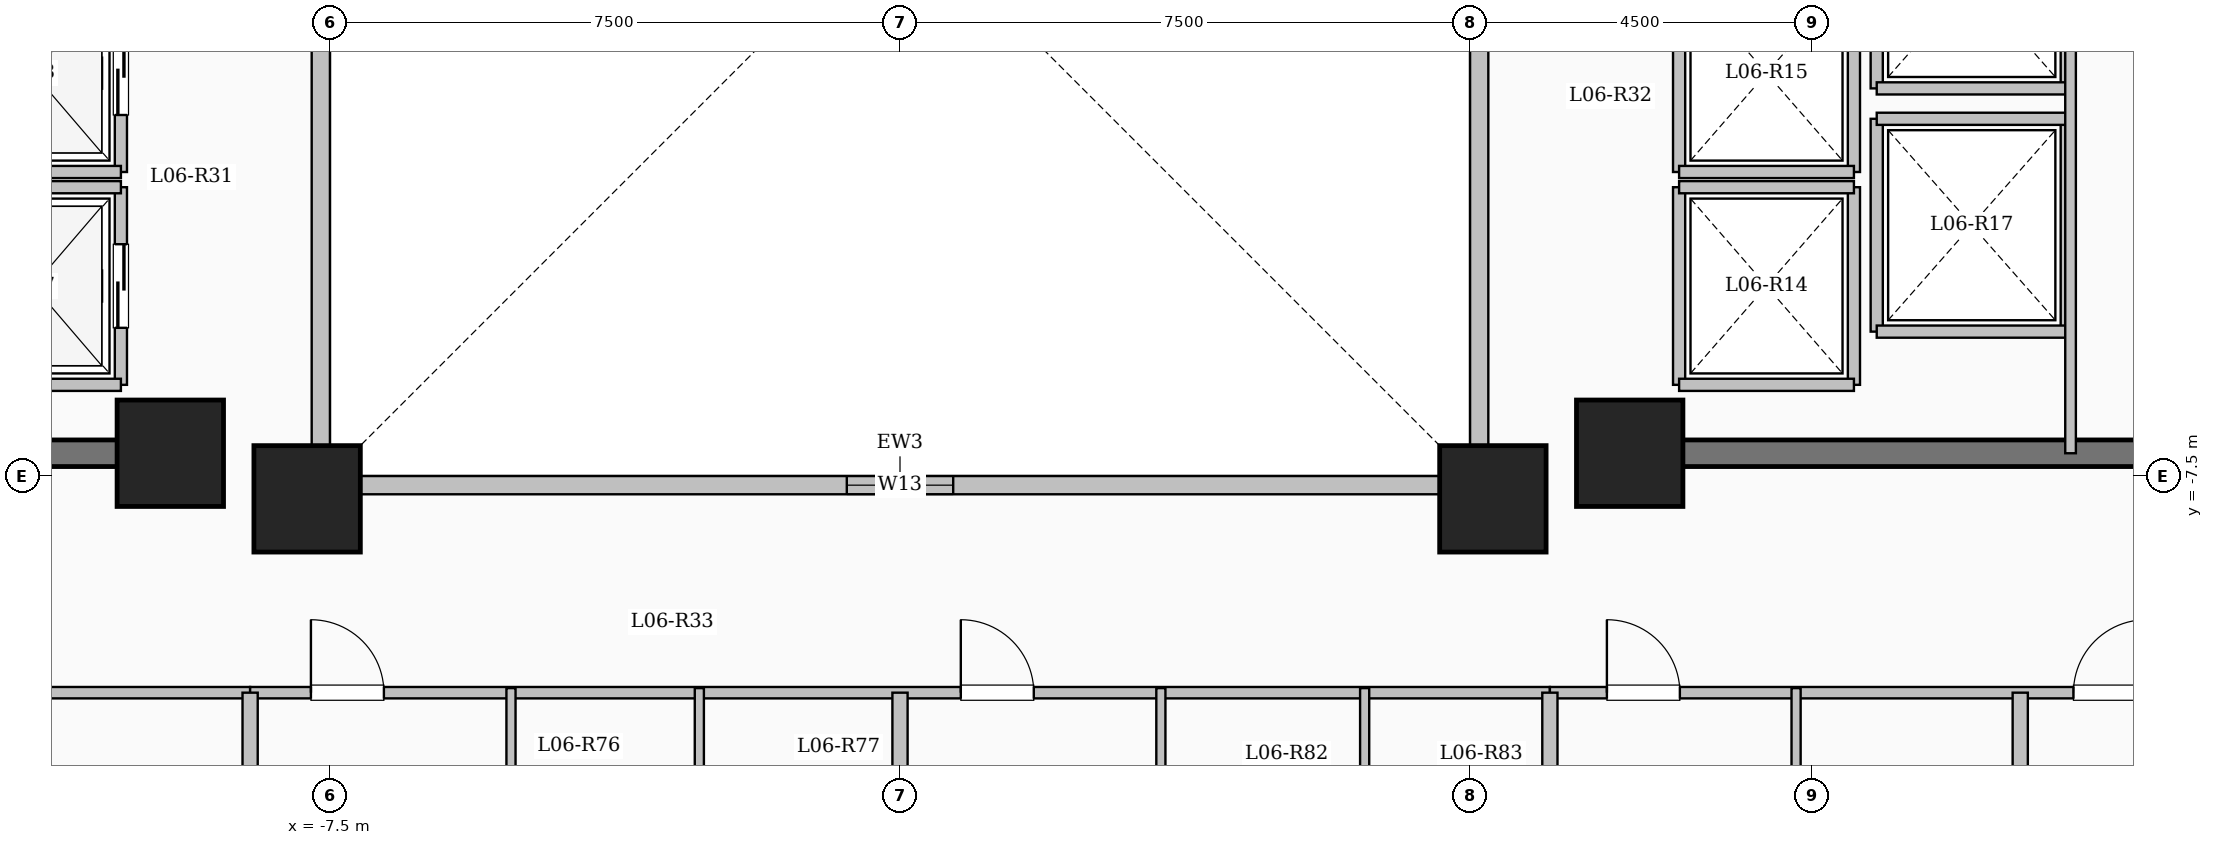
"""IFC4 building model, lengths in metres.
Left out: names, types, materials, properties, quantities, classifications, styles, units other than length and angle.
Written with IfcOpenShell. Run it as: python <this file> out.ifc"""

import sys

from ifc_helpers import new_model, si_unit, direction, frame, frame_2d, origin, origin_2d, place, context, subcontext, project, spatial, rectangle, extrude, element, fill, save


model = new_model("IFC4")
c1 = context("Model", 3, precision=1e-05, world=origin(), true_north=direction((0.0, 1.0)))
c2 = subcontext(c1, "Body", "Model", "MODEL_VIEW")
j1 = project(units=[si_unit("LENGTHUNIT", "METRE"), si_unit("PLANEANGLEUNIT", "RADIAN")], contexts=[c1])
p1 = place(None, origin())
s1 = spatial("IfcSite", under=j1, at=p1, CompositionType="ELEMENT")
p2 = place(p1, origin())
s2 = spatial("IfcBuilding", under=s1, at=p2, CompositionType="ELEMENT")
p3 = place(p2, frame((0.0, 0.0, 27.35)))
s3 = spatial("IfcBuildingStorey", under=s2, at=p3, CompositionType="ELEMENT", Elevation=27.35)
for number, where, z_axis, x_axis in (
    (1, (-7.8, -7.8, 0.0), (0.0, 0.0, 1.0), (1.0, 0.0, 0.0)),
    (2, (7.8, -7.8, 0.0), (0.0, 0.0, 1.0), (1.0, 0.0, 0.0)),
    (3, (-9.6, -7.2, 0.0), (0.0, 0.0, 1.0), (1.0, 0.0, 0.0)),
    (4, (9.6, -7.2, 0.0), (0.0, 0.0, 1.0), (1.0, 0.0, 0.0)),
):
    element("IfcColumn", number, at=place(p3, frame(where, z_axis=z_axis, x_axis=x_axis)), inside=s3, PredefinedType="COLUMN", context=c2, shape_type="SweptSolid", body=[
        extrude(rectangle(XDim=1.4, YDim=1.4, at=origin_2d()), origin(), (0.0, 0.0, 1.0), 3.35),
    ])
p4 = place(p3, frame((-7.62, -7.62, 0.0), z_axis=(0.0, 0.0, 1.0), x_axis=(1.0, 0.0, 0.0)))
e5 = element("IfcWall", 5, at=p4, inside=s3, PredefinedType="SOLIDWALL", context=c2, shape_type="SweptSolid", body=[
    extrude(rectangle(XDim=15.24, YDim=0.24, at=frame_2d((7.62, 0.0))), origin(), (0.0, 0.0, 1.0), 3.1),
])
p5 = place(p4, frame((6.92, 0.0, 0.95)))
e6 = element("IfcOpeningElement", 6, at=p5, cuts=e5, PredefinedType="OPENING", context=c2, shape_type="SweptSolid", body=[
    extrude(rectangle(XDim=1.4, YDim=1.5, at=frame_2d((0.7, 0.75))), frame((0.0, 0.13, 0.0), z_axis=(0.0, -1.0, 0.0), x_axis=(1.0, 0.0, 0.0)), (0.0, 0.0, 1.0), 0.26),
])
p6 = place(p3, frame((7.62, -7.62, 0.0), z_axis=(0.0, 0.0, 1.0), x_axis=(0.0, 1.0, 0.0)))
e7 = element("IfcWall", 7, at=p6, inside=s3, PredefinedType="SOLIDWALL", context=c2, shape_type="SweptSolid", body=[
    extrude(rectangle(XDim=15.24, YDim=0.24, at=frame_2d((7.62, 0.0))), origin(), (0.0, 0.0, 1.0), 3.1),
])
p7 = place(p6, frame((6.92, 0.0, 0.95)))
e8 = element("IfcOpeningElement", 8, at=p7, cuts=e7, PredefinedType="OPENING", context=c2, shape_type="SweptSolid", body=[
    extrude(rectangle(XDim=1.4, YDim=1.5, at=frame_2d((0.7, 0.75))), frame((0.0, 0.13, 0.0), z_axis=(0.0, -1.0, 0.0), x_axis=(1.0, 0.0, 0.0)), (0.0, 0.0, 1.0), 0.26),
])
p8 = place(p3, frame((-7.62, 7.62, 0.0), z_axis=(0.0, 0.0, 1.0), x_axis=(0.0, -1.0, 0.0)))
e9 = element("IfcWall", 9, at=p8, inside=s3, PredefinedType="SOLIDWALL", context=c2, shape_type="SweptSolid", body=[
    extrude(rectangle(XDim=15.24, YDim=0.24, at=frame_2d((7.62, 0.0))), origin(), (0.0, 0.0, 1.0), 3.1),
])
p9 = place(p8, frame((6.92, 0.0, 0.95)))
e10 = element("IfcOpeningElement", 10, at=p9, cuts=e9, PredefinedType="OPENING", context=c2, shape_type="SweptSolid", body=[
    extrude(rectangle(XDim=1.4, YDim=1.5, at=frame_2d((0.7, 0.75))), frame((0.0, 0.13, 0.0), z_axis=(0.0, -1.0, 0.0), x_axis=(1.0, 0.0, 0.0)), (0.0, 0.0, 1.0), 0.26),
])
p10 = place(p3, frame((-10.25, -6.3, 0.0), z_axis=(0.0, 0.0, 1.0), x_axis=(0.0, 1.0, 0.0)))
e11 = element("IfcWall", 11, at=p10, inside=s3, PredefinedType="SOLIDWALL", context=c2, shape_type="SweptSolid", body=[
    extrude(rectangle(XDim=2.6, YDim=0.16, at=frame_2d((1.3, 0.0))), origin(), (0.0, 0.0, 1.0), 3.1),
])
p11 = place(p10, frame((0.75, 0.0, 0.0)))
e12 = element("IfcOpeningElement", 12, at=p11, cuts=e11, PredefinedType="OPENING", context=c2, shape_type="SweptSolid", body=[
    extrude(rectangle(XDim=1.1, YDim=2.15, at=frame_2d((0.55, 1.075))), frame((0.0, 0.09, 0.0), z_axis=(0.0, -1.0, 0.0), x_axis=(1.0, 0.0, 0.0)), (0.0, 0.0, 1.0), 0.18),
])
for number, where, z_axis, x_axis in (
    (13, (-12.55, -6.3, 0.0), (0.0, 0.0, 1.0), (1.0, 0.0, 0.0)),
    (14, (-12.55, -3.7, 0.0), (0.0, 0.0, 1.0), (1.0, 0.0, 0.0)),
):
    element("IfcWall", number, at=place(p3, frame(where, z_axis=z_axis, x_axis=x_axis)), inside=s3, PredefinedType="SOLIDWALL", context=c2, shape_type="SweptSolid", body=[
        extrude(rectangle(XDim=2.3, YDim=0.16, at=frame_2d((1.15, 0.0))), origin(), (0.0, 0.0, 1.0), 3.1),
    ])
p12 = place(p3, frame((-10.25, -3.5, 0.0), z_axis=(0.0, 0.0, 1.0), x_axis=(0.0, 1.0, 0.0)))
e15 = element("IfcWall", 15, at=p12, inside=s3, PredefinedType="SOLIDWALL", context=c2, shape_type="SweptSolid", body=[
    extrude(rectangle(XDim=2.6, YDim=0.16, at=frame_2d((1.3, 0.0))), origin(), (0.0, 0.0, 1.0), 3.1),
])
p13 = place(p12, frame((0.75, 0.0, 0.0)))
e16 = element("IfcOpeningElement", 16, at=p13, cuts=e15, PredefinedType="OPENING", context=c2, shape_type="SweptSolid", body=[
    extrude(rectangle(XDim=1.1, YDim=2.15, at=frame_2d((0.55, 1.075))), frame((0.0, 0.09, 0.0), z_axis=(0.0, -1.0, 0.0), x_axis=(1.0, 0.0, 0.0)), (0.0, 0.0, 1.0), 0.18),
])
p14 = place(p3, frame((-12.55, -3.5, 0.0), z_axis=(0.0, 0.0, 1.0), x_axis=(1.0, 0.0, 0.0)))
e17 = element("IfcWall", 17, at=p14, inside=s3, PredefinedType="SOLIDWALL", context=c2, shape_type="SweptSolid", body=[
    extrude(rectangle(XDim=2.3, YDim=0.16, at=frame_2d((1.15, 0.0))), origin(), (0.0, 0.0, 1.0), 3.1),
])
for number, where, z_axis, x_axis in (
    (18, (10.25, -6.3, 0.0), (0.0, 0.0, 1.0), (0.0, 1.0, 0.0)),
    (19, (12.55, -6.3, 0.0), (0.0, 0.0, 1.0), (0.0, 1.0, 0.0)),
):
    element("IfcWall", number, at=place(p3, frame(where, z_axis=z_axis, x_axis=x_axis)), inside=s3, PredefinedType="SOLIDWALL", context=c2, shape_type="SweptSolid", body=[
        extrude(rectangle(XDim=2.6, YDim=0.16, at=frame_2d((1.3, 0.0))), origin(), (0.0, 0.0, 1.0), 3.1),
    ])
for number, where, z_axis, x_axis in (
    (20, (10.25, -6.3, 0.0), (0.0, 0.0, 1.0), (1.0, 0.0, 0.0)),
    (21, (10.25, -3.7, 0.0), (0.0, 0.0, 1.0), (1.0, 0.0, 0.0)),
):
    element("IfcWall", number, at=place(p3, frame(where, z_axis=z_axis, x_axis=x_axis)), inside=s3, PredefinedType="SOLIDWALL", context=c2, shape_type="SweptSolid", body=[
        extrude(rectangle(XDim=2.3, YDim=0.16, at=frame_2d((1.15, 0.0))), origin(), (0.0, 0.0, 1.0), 3.1),
    ])
for number, where, z_axis, x_axis in (
    (22, (10.25, -3.5, 0.0), (0.0, 0.0, 1.0), (0.0, 1.0, 0.0)),
    (23, (12.55, -3.5, 0.0), (0.0, 0.0, 1.0), (0.0, 1.0, 0.0)),
):
    element("IfcWall", number, at=place(p3, frame(where, z_axis=z_axis, x_axis=x_axis)), inside=s3, PredefinedType="SOLIDWALL", context=c2, shape_type="SweptSolid", body=[
        extrude(rectangle(XDim=2.6, YDim=0.16, at=frame_2d((1.3, 0.0))), origin(), (0.0, 0.0, 1.0), 3.1),
    ])
p15 = place(p3, frame((10.25, -3.5, 0.0), z_axis=(0.0, 0.0, 1.0), x_axis=(1.0, 0.0, 0.0)))
e24 = element("IfcWall", 24, at=p15, inside=s3, PredefinedType="SOLIDWALL", context=c2, shape_type="SweptSolid", body=[
    extrude(rectangle(XDim=2.3, YDim=0.16, at=frame_2d((1.15, 0.0))), origin(), (0.0, 0.0, 1.0), 3.1),
])
for number, where, z_axis, x_axis in (
    (25, (12.85, -5.6, 0.0), (0.0, 0.0, 1.0), (0.0, 1.0, 0.0)),
    (26, (15.35, -5.6, 0.0), (0.0, 0.0, 1.0), (0.0, 1.0, 0.0)),
):
    element("IfcWall", number, at=place(p3, frame(where, z_axis=z_axis, x_axis=x_axis)), inside=s3, PredefinedType="SOLIDWALL", context=c2, shape_type="SweptSolid", body=[
        extrude(rectangle(XDim=2.8, YDim=0.16, at=frame_2d((1.4, 0.0))), origin(), (0.0, 0.0, 1.0), 3.1),
    ])
for number, where, z_axis, x_axis in (
    (27, (12.85, -5.6, 0.0), (0.0, 0.0, 1.0), (1.0, 0.0, 0.0)),
    (28, (12.85, -2.8, 0.0), (0.0, 0.0, 1.0), (1.0, 0.0, 0.0)),
):
    element("IfcWall", number, at=place(p3, frame(where, z_axis=z_axis, x_axis=x_axis)), inside=s3, PredefinedType="SOLIDWALL", context=c2, shape_type="SweptSolid", body=[
        extrude(rectangle(XDim=2.5, YDim=0.16, at=frame_2d((1.25, 0.0))), origin(), (0.0, 0.0, 1.0), 3.1),
    ])
for number, where, z_axis, x_axis in (
    (29, (12.85, -2.4, 0.0), (0.0, 0.0, 1.0), (0.0, 1.0, 0.0)),
    (30, (15.35, -2.4, 0.0), (0.0, 0.0, 1.0), (0.0, 1.0, 0.0)),
):
    element("IfcWall", number, at=place(p3, frame(where, z_axis=z_axis, x_axis=x_axis)), inside=s3, PredefinedType="SOLIDWALL", context=c2, shape_type="SweptSolid", body=[
        extrude(rectangle(XDim=2.8, YDim=0.16, at=frame_2d((1.4, 0.0))), origin(), (0.0, 0.0, 1.0), 3.1),
    ])
p16 = place(p3, frame((12.85, -2.4, 0.0), z_axis=(0.0, 0.0, 1.0), x_axis=(1.0, 0.0, 0.0)))
e31 = element("IfcWall", 31, at=p16, inside=s3, PredefinedType="SOLIDWALL", context=c2, shape_type="SweptSolid", body=[
    extrude(rectangle(XDim=2.5, YDim=0.16, at=frame_2d((1.25, 0.0))), origin(), (0.0, 0.0, 1.0), 3.1),
])
for number, where, z_axis, x_axis in (
    (32, (-18.625, -7.2, 0.0), (0.0, 0.0, 1.0), (1.0, 0.0, 0.0)),
    (33, (10.075, -7.2, 0.0), (0.0, 0.0, 1.0), (1.0, 0.0, 0.0)),
):
    element("IfcWall", number, at=place(p3, frame(where, z_axis=z_axis, x_axis=x_axis)), inside=s3, PredefinedType="SHEAR", context=c2, shape_type="SweptSolid", body=[
        extrude(rectangle(XDim=8.55, YDim=0.35, at=frame_2d((4.275, 0.0))), origin(), (0.0, 0.0, 1.0), 3.35),
    ])
p17 = place(p3, frame((15.4, -7.2, 0.0), z_axis=(0.0, 0.0, 1.0), x_axis=(0.0, 1.0, 0.0)))
e34 = element("IfcWall", 34, at=p17, inside=s3, PredefinedType="PARTITIONING", context=c2, shape_type="SweptSolid", body=[
    extrude(rectangle(XDim=10.45, YDim=0.14, at=frame_2d((5.225, 0.0))), origin(), (0.0, 0.0, 1.0), 3.1),
])
p18 = place(p17, frame((9.25, 0.0, 0.0)))
e35 = element("IfcOpeningElement", 35, at=p18, cuts=e34, PredefinedType="OPENING", context=c2, shape_type="SweptSolid", body=[
    extrude(rectangle(XDim=0.9, YDim=2.08, at=frame_2d((0.45, 1.04))), frame((0.0, 0.08, 0.0), z_axis=(0.0, -1.0, 0.0), x_axis=(1.0, 0.0, 0.0)), (0.0, 0.0, 1.0), 0.16),
])
p19 = place(p3, frame((-22.55, -10.35, 0.0), z_axis=(0.0, 0.0, 1.0), x_axis=(1.0, 0.0, 0.0)))
e36 = element("IfcWall", 36, at=p19, inside=s3, PredefinedType="PARTITIONING", context=c2, shape_type="SweptSolid", body=[
    extrude(rectangle(XDim=14.0, YDim=0.15, at=frame_2d((7.0, 0.0))), origin(), (0.0, 0.0, 1.0), 3.1),
])
p20 = place(p19, frame((0.7, 0.0, 0.0)))
e37 = element("IfcOpeningElement", 37, at=p20, cuts=e36, PredefinedType="OPENING", context=c2, shape_type="SweptSolid", body=[
    extrude(rectangle(XDim=0.96, YDim=2.15, at=frame_2d((0.48, 1.075))), frame((0.0, 0.085, 0.0), z_axis=(0.0, -1.0, 0.0), x_axis=(1.0, 0.0, 0.0)), (0.0, 0.0, 1.0), 0.17),
])
p21 = place(p19, frame((7.396, 0.0, 0.0)))
e38 = element("IfcOpeningElement", 38, at=p21, cuts=e36, PredefinedType="OPENING", context=c2, shape_type="SweptSolid", body=[
    extrude(rectangle(XDim=0.96, YDim=2.15, at=frame_2d((0.48, 1.075))), frame((0.0, 0.085, 0.0), z_axis=(0.0, -1.0, 0.0), x_axis=(1.0, 0.0, 0.0)), (0.0, 0.0, 1.0), 0.17),
])
p22 = place(p3, frame((-8.55, -10.35, 0.0), z_axis=(0.0, 0.0, 1.0), x_axis=(1.0, 0.0, 0.0)))
e39 = element("IfcWall", 39, at=p22, inside=s3, PredefinedType="PARTITIONING", context=c2, shape_type="SweptSolid", body=[
    extrude(rectangle(XDim=17.1, YDim=0.15, at=frame_2d((8.55, 0.0))), origin(), (0.0, 0.0, 1.0), 3.1),
])
p23 = place(p22, frame((0.8, 0.0, 0.0)))
e40 = element("IfcOpeningElement", 40, at=p23, cuts=e39, PredefinedType="OPENING", context=c2, shape_type="SweptSolid", body=[
    extrude(rectangle(XDim=0.96, YDim=2.15, at=frame_2d((0.48, 1.075))), frame((0.0, 0.085, 0.0), z_axis=(0.0, -1.0, 0.0), x_axis=(1.0, 0.0, 0.0)), (0.0, 0.0, 1.0), 0.17),
])
p24 = place(p22, frame((9.35, 0.0, 0.0)))
e41 = element("IfcOpeningElement", 41, at=p24, cuts=e39, PredefinedType="OPENING", context=c2, shape_type="SweptSolid", body=[
    extrude(rectangle(XDim=0.96, YDim=2.15, at=frame_2d((0.48, 1.075))), frame((0.0, 0.085, 0.0), z_axis=(0.0, -1.0, 0.0), x_axis=(1.0, 0.0, 0.0)), (0.0, 0.0, 1.0), 0.17),
])
p25 = place(p3, frame((8.55, -10.35, 0.0), z_axis=(0.0, 0.0, 1.0), x_axis=(1.0, 0.0, 0.0)))
e42 = element("IfcWall", 42, at=p25, inside=s3, PredefinedType="PARTITIONING", context=c2, shape_type="SweptSolid", body=[
    extrude(rectangle(XDim=14.0, YDim=0.15, at=frame_2d((7.0, 0.0))), origin(), (0.0, 0.0, 1.0), 3.1),
])
p26 = place(p25, frame((0.75, 0.0, 0.0)))
e43 = element("IfcOpeningElement", 43, at=p26, cuts=e42, PredefinedType="OPENING", context=c2, shape_type="SweptSolid", body=[
    extrude(rectangle(XDim=0.96, YDim=2.15, at=frame_2d((0.48, 1.075))), frame((0.0, 0.085, 0.0), z_axis=(0.0, -1.0, 0.0), x_axis=(1.0, 0.0, 0.0)), (0.0, 0.0, 1.0), 0.17),
])
p27 = place(p25, frame((6.888, 0.0, 0.0)))
e44 = element("IfcOpeningElement", 44, at=p27, cuts=e42, PredefinedType="OPENING", context=c2, shape_type="SweptSolid", body=[
    extrude(rectangle(XDim=0.96, YDim=2.15, at=frame_2d((0.48, 1.075))), frame((0.0, 0.085, 0.0), z_axis=(0.0, -1.0, 0.0), x_axis=(1.0, 0.0, 0.0)), (0.0, 0.0, 1.0), 0.17),
])
p28 = place(p3, frame((14.738, -23.6, 0.0), z_axis=(0.0, 0.0, 1.0), x_axis=(0.0, 1.0, 0.0)))
e45 = element("IfcWall", 45, at=p28, inside=s3, PredefinedType="SOLIDWALL", context=c2, shape_type="SweptSolid", body=[
    extrude(rectangle(XDim=13.25, YDim=0.2, at=frame_2d((6.625, 0.0))), origin(), (0.0, 0.0, 1.0), 2.435),
])
p29 = place(p3, frame((11.789, -13.51, 0.0), z_axis=(0.0, 0.0, 1.0), x_axis=(0.0, 1.0, 0.0)))
e46 = element("IfcWall", 46, at=p29, inside=s3, PredefinedType="PARTITIONING", context=c2, shape_type="SweptSolid", body=[
    extrude(rectangle(XDim=3.22, YDim=0.12, at=frame_2d((1.61, 0.0))), origin(), (0.0, 0.0, 1.0), 3.1),
])
p30 = place(p29, frame((1.14, 0.0, 0.0)))
e47 = element("IfcOpeningElement", 47, at=p30, cuts=e46, PredefinedType="OPENING", context=c2, shape_type="SweptSolid", body=[
    extrude(rectangle(XDim=0.88, YDim=2.1, at=frame_2d((0.44, 1.05))), frame((0.0, 0.07, 0.0), z_axis=(0.0, -1.0, 0.0), x_axis=(1.0, 0.0, 0.0)), (0.0, 0.0, 1.0), 0.14),
])
for number, where, z_axis, x_axis in (
    (48, (-8.55, -24.204, 0.0), (0.0, 0.0, 1.0), (0.0, 1.0, 0.0)),
    (49, (8.55, -24.204, 0.0), (0.0, 0.0, 1.0), (0.0, 1.0, 0.0)),
):
    element("IfcWall", number, at=place(p3, frame(where, z_axis=z_axis, x_axis=x_axis)), inside=s3, PredefinedType="SOLIDWALL", context=c2, shape_type="SweptSolid", body=[
        extrude(rectangle(XDim=13.854, YDim=0.2, at=frame_2d((6.927, 0.0))), origin(), (0.0, 0.0, 1.0), 3.1),
    ])
p31 = place(p3, frame((0.0, -25.08, 0.0), z_axis=(0.0, 0.0, 1.0), x_axis=(0.0, 1.0, 0.0)))
e50 = element("IfcWall", 50, at=p31, inside=s3, PredefinedType="SOLIDWALL", context=c2, shape_type="SweptSolid", body=[
    extrude(rectangle(XDim=14.73, YDim=0.2, at=frame_2d((7.365, 0.0))), origin(), (0.0, 0.0, 1.0), 3.1),
])
p32 = place(p3, frame((-5.118, -25.051, 0.0), z_axis=(0.0, 0.0, 1.0), x_axis=(0.0, 1.0, 0.0)))
e51 = element("IfcWall", 51, at=p32, inside=s3, PredefinedType="PARTITIONING", context=c2, shape_type="SweptSolid", body=[
    extrude(rectangle(XDim=14.761, YDim=0.12, at=frame_2d((7.38, 0.0))), origin(), (0.0, 0.0, 1.0), 3.1),
])
p33 = place(p32, frame((10.766, 0.0, 0.0)))
e52 = element("IfcOpeningElement", 52, at=p33, cuts=e51, PredefinedType="OPENING", context=c2, shape_type="SweptSolid", body=[
    extrude(rectangle(XDim=1.08, YDim=2.15, at=frame_2d((0.54, 1.075))), frame((0.0, 0.07, 0.0), z_axis=(0.0, -1.0, 0.0), x_axis=(1.0, 0.0, 0.0)), (0.0, 0.0, 1.0), 0.14),
])
p34 = place(p3, frame((-2.64, -12.92, 0.0), z_axis=(0.0, 0.0, 1.0), x_axis=(0.0, 1.0, 0.0)))
e53 = element("IfcWall", 53, at=p34, inside=s3, PredefinedType="PARTITIONING", context=c2, shape_type="SweptSolid", body=[
    extrude(rectangle(XDim=2.63, YDim=0.12, at=frame_2d((1.315, 0.0))), origin(), (0.0, 0.0, 1.0), 3.1),
])
p35 = place(p3, frame((3.432, -25.08, 0.0), z_axis=(0.0, 0.0, 1.0), x_axis=(0.0, 1.0, 0.0)))
e54 = element("IfcWall", 54, at=p35, inside=s3, PredefinedType="PARTITIONING", context=c2, shape_type="SweptSolid", body=[
    extrude(rectangle(XDim=14.79, YDim=0.12, at=frame_2d((7.395, 0.0))), origin(), (0.0, 0.0, 1.0), 3.1),
])
p36 = place(p35, frame((10.625, 0.0, 0.0)))
e55 = element("IfcOpeningElement", 55, at=p36, cuts=e54, PredefinedType="OPENING", context=c2, shape_type="SweptSolid", body=[
    extrude(rectangle(XDim=1.08, YDim=2.15, at=frame_2d((0.54, 1.075))), frame((0.0, 0.07, 0.0), z_axis=(0.0, -1.0, 0.0), x_axis=(1.0, 0.0, 0.0)), (0.0, 0.0, 1.0), 0.14),
])
p37 = place(p3, frame((6.113, -13.09, 0.0), z_axis=(0.0, 0.0, 1.0), x_axis=(0.0, 1.0, 0.0)))
e56 = element("IfcWall", 56, at=p37, inside=s3, PredefinedType="PARTITIONING", context=c2, shape_type="SweptSolid", body=[
    extrude(rectangle(XDim=2.8, YDim=0.12, at=frame_2d((1.4, 0.0))), origin(), (0.0, 0.0, 1.0), 3.1),
])
p38 = place(p5, origin())
e57 = element("IfcWindow", 57, at=p38, inside=s3, PartitioningType="SINGLE_PANEL", PredefinedType="WINDOW", context=c2, shape_type="SweptSolid", body=[
    extrude(rectangle(XDim=1.4, YDim=1.5, at=frame_2d((0.7, 0.75))), frame((0.0, 0.03, 0.0), z_axis=(0.0, -1.0, 0.0), x_axis=(1.0, 0.0, 0.0)), (0.0, 0.0, 1.0), 0.06),
])
fill(e6, e57)
p39 = place(p11, origin())
e58 = element("IfcDoor", 58, at=p39, inside=s3, OperationType="SLIDING_TO_LEFT", PredefinedType="DOOR", context=c2, shape_type="SweptSolid", body=[
    extrude(rectangle(XDim=1.1, YDim=2.15, at=frame_2d((0.55, 1.075))), frame((0.0, 0.025, 0.0), z_axis=(0.0, -1.0, 0.0), x_axis=(1.0, 0.0, 0.0)), (0.0, 0.0, 1.0), 0.05),
])
fill(e12, e58)
p40 = place(p13, origin())
e59 = element("IfcDoor", 59, at=p40, inside=s3, OperationType="SLIDING_TO_LEFT", PredefinedType="DOOR", context=c2, shape_type="SweptSolid", body=[
    extrude(rectangle(XDim=1.1, YDim=2.15, at=frame_2d((0.55, 1.075))), frame((0.0, 0.025, 0.0), z_axis=(0.0, -1.0, 0.0), x_axis=(1.0, 0.0, 0.0)), (0.0, 0.0, 1.0), 0.05),
])
fill(e16, e59)
p41 = place(p26, origin())
e60 = element("IfcDoor", 60, at=p41, inside=s3, OperationType="SINGLE_SWING_LEFT", PredefinedType="DOOR", context=c2, shape_type="SweptSolid", body=[
    extrude(rectangle(XDim=0.96, YDim=2.15, at=frame_2d((0.48, 1.075))), frame((0.0, 0.025, 0.0), z_axis=(0.0, -1.0, 0.0), x_axis=(1.0, 0.0, 0.0)), (0.0, 0.0, 1.0), 0.05),
])
fill(e43, e60)
p42 = place(p27, origin())
e61 = element("IfcDoor", 61, at=p42, inside=s3, OperationType="SINGLE_SWING_RIGHT", PredefinedType="DOOR", context=c2, shape_type="SweptSolid", body=[
    extrude(rectangle(XDim=0.96, YDim=2.15, at=frame_2d((0.48, 1.075))), frame((0.0, 0.025, 0.0), z_axis=(0.0, -1.0, 0.0), x_axis=(1.0, 0.0, 0.0)), (0.0, 0.0, 1.0), 0.05),
])
fill(e44, e61)
p43 = place(p23, origin())
e62 = element("IfcDoor", 62, at=p43, inside=s3, OperationType="SINGLE_SWING_LEFT", PredefinedType="DOOR", context=c2, shape_type="SweptSolid", body=[
    extrude(rectangle(XDim=0.96, YDim=2.15, at=frame_2d((0.48, 1.075))), frame((0.0, 0.025, 0.0), z_axis=(0.0, -1.0, 0.0), x_axis=(1.0, 0.0, 0.0)), (0.0, 0.0, 1.0), 0.05),
])
fill(e40, e62)
p44 = place(p24, origin())
e63 = element("IfcDoor", 63, at=p44, inside=s3, OperationType="SINGLE_SWING_LEFT", PredefinedType="DOOR", context=c2, shape_type="SweptSolid", body=[
    extrude(rectangle(XDim=0.96, YDim=2.15, at=frame_2d((0.48, 1.075))), frame((0.0, 0.025, 0.0), z_axis=(0.0, -1.0, 0.0), x_axis=(1.0, 0.0, 0.0)), (0.0, 0.0, 1.0), 0.05),
])
fill(e41, e63)
save(model, sys.argv[1])
